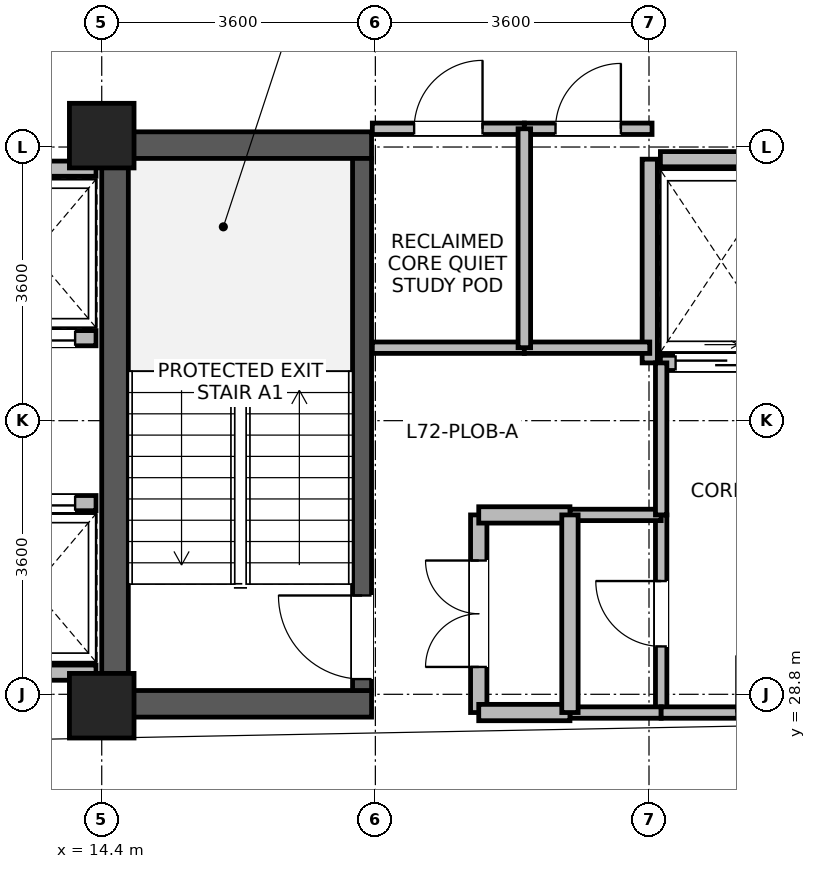
"""IFC4 building model, lengths in metres.
Left out: names, types, materials, properties, quantities, classifications, styles, units other than length and angle.
Written with IfcOpenShell. Run it as: python <this file> out.ifc"""

import sys

from ifc_helpers import new_model, si_unit, direction, frame, frame_2d, origin, origin_2d, place, context, subcontext, project, spatial, rectangle, extrude, source, transform, mapped, element, fill, save


model = new_model("IFC4")
c1 = context("Model", 3, precision=1e-05, world=origin(), true_north=direction((0.0, 1.0)))
c2 = subcontext(c1, "Body", "Model", "MODEL_VIEW")
j1 = project(units=[si_unit("LENGTHUNIT", "METRE"), si_unit("PLANEANGLEUNIT", "RADIAN")], contexts=[c1])
p1 = place(None, origin())
s1 = spatial("IfcSite", under=j1, at=p1, CompositionType="ELEMENT")
p2 = place(p1, origin())
s2 = spatial("IfcBuilding", under=s1, at=p2, CompositionType="ELEMENT")
p3 = place(p2, frame((0.0, 0.0, 279.5)))
s3 = spatial("IfcBuildingStorey", under=s2, at=p3, CompositionType="ELEMENT", Elevation=279.5)
p4 = place(p3, frame((14.575, 28.5, 0.0), z_axis=(0.0, 0.0, 1.0), x_axis=(0.0, 1.0, 0.0)))
e1 = element("IfcWall", 1, at=p4, inside=s3, PredefinedType="SHEAR", context=c2, shape_type="SweptSolid", body=[
    extrude(rectangle(XDim=7.7, YDim=0.35, at=frame_2d((3.85, 0.0))), origin(), (0.0, 0.0, 1.0), 3.475),
])
for number, where, z_axis, x_axis in (
    (2, (14.75, 28.675, 0.0), (0.0, 0.0, 1.0), (1.0, 0.0, 0.0)),
    (3, (14.75, 36.025, 0.0), (0.0, 0.0, 1.0), (1.0, 0.0, 0.0)),
):
    element("IfcWall", number, at=place(p3, frame(where, z_axis=z_axis, x_axis=x_axis)), inside=s3, PredefinedType="SHEAR", context=c2, shape_type="SweptSolid", body=[
        extrude(rectangle(XDim=3.2, YDim=0.35, at=frame_2d((1.6, 0.0))), origin(), (0.0, 0.0, 1.0), 3.475),
    ])
p5 = place(p3, frame((17.825, 28.85, 0.0), z_axis=(0.0, 0.0, 1.0), x_axis=(0.0, 1.0, 0.0)))
e4 = element("IfcWall", 4, at=p5, inside=s3, PredefinedType="SHEAR", context=c2, shape_type="SweptSolid", body=[
    extrude(rectangle(XDim=7.0, YDim=0.25, at=frame_2d((3.5, 0.0))), origin(), (0.0, 0.0, 1.0), 3.475),
])
p6 = place(p5, frame((0.15, 0.0, 0.0)))
e5 = element("IfcOpeningElement", 5, at=p6, cuts=e4, PredefinedType="OPENING", context=c2, shape_type="SweptSolid", body=[
    extrude(rectangle(XDim=1.1, YDim=2.08, at=frame_2d((0.55, 1.04))), frame((0.0, 0.135, 0.0), z_axis=(0.0, -1.0, 0.0), x_axis=(1.0, 0.0, 0.0)), (0.0, 0.0, 1.0), 0.27),
])
m1 = source(origin(), c2, "Body", "SweptSolid", [
    extrude(rectangle(XDim=0.85, YDim=0.85, at=origin_2d()), origin(), (0.0, 0.0, 1.0), 3.7),
])
for number, where, z_axis, x_axis in (
    (6, (14.4, 28.65, 0.0), (0.0, 0.0, 1.0), (1.0, 0.0, 0.0)),
    (7, (14.4, 36.15, 0.0), (0.0, 0.0, 1.0), (1.0, 0.0, 0.0)),
):
    element("IfcColumn", number, at=place(p3, frame(where, z_axis=z_axis, x_axis=x_axis)), inside=s3, PredefinedType="COLUMN", context=c2, shape_type="MappedRepresentation", body=[
        mapped(m1, transform((0.0, 0.0, 0.0), x_axis=(1.0, 0.0, 0.0), y_axis=(0.0, 1.0, 0.0), z_axis=(0.0, 0.0, 1.0), scale=1.0)),
    ])
p7 = place(p3, frame((12.675, 33.485, 0.0), z_axis=(0.0, 0.0, 1.0), x_axis=(1.0, 0.0, 0.0)))
e8 = element("IfcWall", 8, at=p7, inside=s3, PredefinedType="PARTITIONING", context=c2, shape_type="SweptSolid", body=[
    extrude(rectangle(XDim=1.65, YDim=0.2, at=frame_2d((0.825, 0.0))), origin(), (0.0, 0.0, 1.0), 3.455),
])
p8 = place(p7, frame((0.275, 0.0, 0.0)))
e9 = element("IfcOpeningElement", 9, at=p8, cuts=e8, PredefinedType="OPENING", context=c2, shape_type="SweptSolid", body=[
    extrude(rectangle(XDim=1.1, YDim=2.12, at=frame_2d((0.55, 1.06))), frame((0.0, 0.11, 0.0), z_axis=(0.0, -1.0, 0.0), x_axis=(1.0, 0.0, 0.0)), (0.0, 0.0, 1.0), 0.22),
])
for number, where, z_axis, x_axis in (
    (10, (12.675, 35.715, 0.0), (0.0, 0.0, 1.0), (1.0, 0.0, 0.0)),
    (11, (12.675, 29.085, 0.0), (0.0, 0.0, 1.0), (1.0, 0.0, 0.0)),
):
    element("IfcWall", number, at=place(p3, frame(where, z_axis=z_axis, x_axis=x_axis)), inside=s3, PredefinedType="PARTITIONING", context=c2, shape_type="SweptSolid", body=[
        extrude(rectangle(XDim=1.65, YDim=0.2, at=frame_2d((0.825, 0.0))), origin(), (0.0, 0.0, 1.0), 3.455),
    ])
p9 = place(p3, frame((12.675, 31.315, 0.0), z_axis=(0.0, 0.0, 1.0), x_axis=(1.0, 0.0, 0.0)))
e12 = element("IfcWall", 12, at=p9, inside=s3, PredefinedType="PARTITIONING", context=c2, shape_type="SweptSolid", body=[
    extrude(rectangle(XDim=1.65, YDim=0.2, at=frame_2d((0.825, 0.0))), origin(), (0.0, 0.0, 1.0), 3.455),
])
p10 = place(p9, frame((0.275, 0.0, 0.0)))
e13 = element("IfcOpeningElement", 13, at=p10, cuts=e12, PredefinedType="OPENING", context=c2, shape_type="SweptSolid", body=[
    extrude(rectangle(XDim=1.1, YDim=2.12, at=frame_2d((0.55, 1.06))), frame((0.0, 0.11, 0.0), z_axis=(0.0, -1.0, 0.0), x_axis=(1.0, 0.0, 0.0)), (0.0, 0.0, 1.0), 0.22),
])
p11 = place(p3, frame((21.75, 33.16, 0.0), z_axis=(0.0, 0.0, 1.0), x_axis=(1.0, 0.0, 0.0)))
e14 = element("IfcWall", 14, at=p11, inside=s3, PredefinedType="PARTITIONING", context=c2, shape_type="SweptSolid", body=[
    extrude(rectangle(XDim=1.6, YDim=0.2, at=frame_2d((0.8, 0.0))), origin(), (0.0, 0.0, 1.0), 3.455),
])
p12 = place(p11, frame((0.2, 0.0, 0.0)))
e15 = element("IfcOpeningElement", 15, at=p12, cuts=e14, PredefinedType="OPENING", context=c2, shape_type="SweptSolid", body=[
    extrude(rectangle(XDim=1.2, YDim=2.12, at=frame_2d((0.6, 1.06))), frame((0.0, 0.11, 0.0), z_axis=(0.0, -1.0, 0.0), x_axis=(1.0, 0.0, 0.0)), (0.0, 0.0, 1.0), 0.22),
])
p13 = place(p3, frame((21.75, 35.84, 0.0), z_axis=(0.0, 0.0, 1.0), x_axis=(1.0, 0.0, 0.0)))
e16 = element("IfcWall", 16, at=p13, inside=s3, PredefinedType="PARTITIONING", context=c2, shape_type="SweptSolid", body=[
    extrude(rectangle(XDim=1.6, YDim=0.2, at=frame_2d((0.8, 0.0))), origin(), (0.0, 0.0, 1.0), 2.555),
])
p14 = place(p3, frame((21.61, 33.16, 0.0), z_axis=(0.0, 0.0, 1.0), x_axis=(0.0, 1.0, 0.0)))
e17 = element("IfcWall", 17, at=p14, inside=s3, PredefinedType="PARTITIONING", context=c2, shape_type="SweptSolid", body=[
    extrude(rectangle(XDim=2.68, YDim=0.2, at=frame_2d((1.34, 0.0))), origin(), (0.0, 0.0, 1.0), 3.455),
])
p15 = place(p3, frame((19.36, 28.56, 0.0), z_axis=(0.0, 0.0, 1.0), x_axis=(0.0, 1.0, 0.0)))
e18 = element("IfcWall", 18, at=p15, inside=s3, PredefinedType="PARTITIONING", context=c2, shape_type="SweptSolid", body=[
    extrude(rectangle(XDim=2.6, YDim=0.215, at=frame_2d((1.3, 0.0))), origin(), (0.0, 0.0, 1.0), 3.455),
])
p16 = place(p15, frame((0.6, 0.0, 0.0)))
e19 = element("IfcOpeningElement", 19, at=p16, cuts=e18, PredefinedType="OPENING", context=c2, shape_type="SweptSolid", body=[
    extrude(rectangle(XDim=1.4, YDim=2.15, at=frame_2d((0.7, 1.075))), frame((0.0, 0.118, 0.0), z_axis=(0.0, -1.0, 0.0), x_axis=(1.0, 0.0, 0.0)), (0.0, 0.0, 1.0), 0.235),
])
p17 = place(p3, frame((21.76, 28.56, 0.0), z_axis=(0.0, 0.0, 1.0), x_axis=(0.0, 1.0, 0.0)))
e20 = element("IfcWall", 20, at=p17, inside=s3, PredefinedType="PARTITIONING", context=c2, shape_type="SweptSolid", body=[
    extrude(rectangle(XDim=2.6, YDim=0.15, at=frame_2d((1.3, 0.0))), origin(), (0.0, 0.0, 1.0), 3.455),
])
p18 = place(p17, frame((0.87, 0.0, 0.0)))
e21 = element("IfcOpeningElement", 21, at=p18, cuts=e20, PredefinedType="OPENING", context=c2, shape_type="SweptSolid", body=[
    extrude(rectangle(XDim=0.86, YDim=2.02, at=frame_2d((0.43, 1.01))), frame((0.0, 0.085, 0.0), z_axis=(0.0, -1.0, 0.0), x_axis=(1.0, 0.0, 0.0)), (0.0, 0.0, 1.0), 0.17),
])
p19 = place(p3, frame((17.96, 33.36, 0.0), z_axis=(0.0, 0.0, 1.0), x_axis=(1.0, 0.0, 0.0)))
e22 = element("IfcWall", 22, at=p19, inside=s3, PredefinedType="PARTITIONING", context=c2, shape_type="SweptSolid", body=[
    extrude(rectangle(XDim=2.0, YDim=0.15, at=frame_2d((1.0, 0.0))), origin(), (0.0, 0.0, 1.0), 3.455),
])
p20 = place(p3, frame((17.96, 36.24, 0.0), z_axis=(0.0, 0.0, 1.0), x_axis=(1.0, 0.0, 0.0)))
e23 = element("IfcWall", 23, at=p20, inside=s3, PredefinedType="PARTITIONING", context=c2, shape_type="SweptSolid", body=[
    extrude(rectangle(XDim=2.0, YDim=0.15, at=frame_2d((1.0, 0.0))), origin(), (0.0, 0.0, 1.0), 2.555),
])
p21 = place(p20, frame((0.55, 0.0, 0.0)))
e24 = element("IfcOpeningElement", 24, at=p21, cuts=e23, PredefinedType="OPENING", context=c2, shape_type="SweptSolid", body=[
    extrude(rectangle(XDim=0.9, YDim=2.08, at=frame_2d((0.45, 1.04))), frame((0.0, 0.085, 0.0), z_axis=(0.0, -1.0, 0.0), x_axis=(1.0, 0.0, 0.0)), (0.0, 0.0, 1.0), 0.17),
])
p22 = place(p3, frame((19.96, 33.36, 0.0), z_axis=(0.0, 0.0, 1.0), x_axis=(1.0, 0.0, 0.0)))
e25 = element("IfcWall", 25, at=p22, inside=s3, PredefinedType="PARTITIONING", context=c2, shape_type="SweptSolid", body=[
    extrude(rectangle(XDim=1.65, YDim=0.15, at=frame_2d((0.825, 0.0))), origin(), (0.0, 0.0, 1.0), 3.455),
])
p23 = place(p3, frame((19.96, 36.24, 0.0), z_axis=(0.0, 0.0, 1.0), x_axis=(1.0, 0.0, 0.0)))
e26 = element("IfcWall", 26, at=p23, inside=s3, PredefinedType="PARTITIONING", context=c2, shape_type="SweptSolid", body=[
    extrude(rectangle(XDim=1.68, YDim=0.15, at=frame_2d((0.84, 0.0))), origin(), (0.0, 0.0, 1.0), 2.555),
])
p24 = place(p23, frame((0.41, 0.0, 0.0)))
e27 = element("IfcOpeningElement", 27, at=p24, cuts=e26, PredefinedType="OPENING", context=c2, shape_type="SweptSolid", body=[
    extrude(rectangle(XDim=0.86, YDim=2.02, at=frame_2d((0.43, 1.01))), frame((0.0, 0.085, 0.0), z_axis=(0.0, -1.0, 0.0), x_axis=(1.0, 0.0, 0.0)), (0.0, 0.0, 1.0), 0.17),
])
p25 = place(p3, frame((20.56, 28.56, 0.0), z_axis=(0.0, 0.0, 1.0), x_axis=(1.0, 0.0, 0.0)))
e28 = element("IfcWall", 28, at=p25, inside=s3, PredefinedType="PARTITIONING", context=c2, shape_type="SweptSolid", body=[
    extrude(rectangle(XDim=1.2, YDim=0.15, at=frame_2d((0.6, 0.0))), origin(), (0.0, 0.0, 1.0), 2.555),
])
p26 = place(p3, frame((20.56, 31.16, 0.0), z_axis=(0.0, 0.0, 1.0), x_axis=(1.0, 0.0, 0.0)))
e29 = element("IfcWall", 29, at=p26, inside=s3, PredefinedType="PARTITIONING", context=c2, shape_type="SweptSolid", body=[
    extrude(rectangle(XDim=1.2, YDim=0.15, at=frame_2d((0.6, 0.0))), origin(), (0.0, 0.0, 1.0), 3.455),
])
p27 = place(p3, frame((19.36, 28.56, 0.0), z_axis=(0.0, 0.0, 1.0), x_axis=(1.0, 0.0, 0.0)))
e30 = element("IfcWall", 30, at=p27, inside=s3, PredefinedType="PARTITIONING", context=c2, shape_type="SweptSolid", body=[
    extrude(rectangle(XDim=1.2, YDim=0.215, at=frame_2d((0.6, 0.0))), origin(), (0.0, 0.0, 1.0), 2.555),
])
p28 = place(p3, frame((19.36, 31.16, 0.0), z_axis=(0.0, 0.0, 1.0), x_axis=(1.0, 0.0, 0.0)))
e31 = element("IfcWall", 31, at=p28, inside=s3, PredefinedType="PARTITIONING", context=c2, shape_type="SweptSolid", body=[
    extrude(rectangle(XDim=1.2, YDim=0.215, at=frame_2d((0.6, 0.0))), origin(), (0.0, 0.0, 1.0), 3.455),
])
p29 = place(p3, frame((21.76, 28.56, 0.0), z_axis=(0.0, 0.0, 1.0), x_axis=(1.0, 0.0, 0.0)))
e32 = element("IfcWall", 32, at=p29, inside=s3, PredefinedType="PARTITIONING", context=c2, shape_type="SweptSolid", body=[
    extrude(rectangle(XDim=3.48, YDim=0.15, at=frame_2d((1.74, 0.0))), origin(), (0.0, 0.0, 1.0), 2.555),
])
p30 = place(p29, frame((0.99, 0.0, 0.0)))
e33 = element("IfcOpeningElement", 33, at=p30, cuts=e32, PredefinedType="OPENING", context=c2, shape_type="SweptSolid", body=[
    extrude(rectangle(XDim=1.5, YDim=2.1, at=frame_2d((0.75, 1.05))), frame((0.0, 0.085, 0.0), z_axis=(0.0, -1.0, 0.0), x_axis=(1.0, 0.0, 0.0)), (0.0, 0.0, 1.0), 0.17),
])
p31 = place(p3, frame((19.96, 33.36, 0.0), z_axis=(0.0, 0.0, 1.0), x_axis=(0.0, 1.0, 0.0)))
e34 = element("IfcWall", 34, at=p31, inside=s3, PredefinedType="PARTITIONING", context=c2, shape_type="SweptSolid", body=[
    extrude(rectangle(XDim=2.88, YDim=0.165, at=frame_2d((1.44, 0.0))), origin(), (0.0, 0.0, 1.0), 3.455),
])
p32 = place(p3, frame((20.56, 28.56, 0.0), z_axis=(0.0, 0.0, 1.0), x_axis=(0.0, 1.0, 0.0)))
e35 = element("IfcWall", 35, at=p32, inside=s3, PredefinedType="PARTITIONING", context=c2, shape_type="SweptSolid", body=[
    extrude(rectangle(XDim=2.6, YDim=0.215, at=frame_2d((1.3, 0.0))), origin(), (0.0, 0.0, 1.0), 3.455),
])
p33 = place(p3, frame((21.76, 31.16, 0.0), z_axis=(0.0, 0.0, 1.0), x_axis=(0.0, 1.0, 0.0)))
e36 = element("IfcWall", 36, at=p33, inside=s3, PredefinedType="PARTITIONING", context=c2, shape_type="SweptSolid", body=[
    extrude(rectangle(XDim=2.0, YDim=0.15, at=frame_2d((1.0, 0.0))), origin(), (0.0, 0.0, 1.0), 3.455),
])
p34 = place(p6, origin())
e37 = element("IfcDoor", 37, at=p34, inside=s3, OperationType="SINGLE_SWING_RIGHT", PredefinedType="DOOR", context=c2, shape_type="SweptSolid", body=[
    extrude(rectangle(XDim=1.1, YDim=2.08, at=frame_2d((0.55, 1.04))), frame((0.0, 0.025, 0.0), z_axis=(0.0, -1.0, 0.0), x_axis=(1.0, 0.0, 0.0)), (0.0, 0.0, 1.0), 0.05),
])
fill(e5, e37)
p35 = place(p8, origin())
e38 = element("IfcDoor", 38, at=p35, inside=s3, OperationType="SLIDING_TO_LEFT", PredefinedType="DOOR", context=c2, shape_type="SweptSolid", body=[
    extrude(rectangle(XDim=1.1, YDim=2.12, at=frame_2d((0.55, 1.06))), frame((0.0, 0.025, 0.0), z_axis=(0.0, -1.0, 0.0), x_axis=(1.0, 0.0, 0.0)), (0.0, 0.0, 1.0), 0.05),
])
fill(e9, e38)
p36 = place(p10, origin())
e39 = element("IfcDoor", 39, at=p36, inside=s3, OperationType="SLIDING_TO_LEFT", PredefinedType="DOOR", context=c2, shape_type="SweptSolid", body=[
    extrude(rectangle(XDim=1.1, YDim=2.12, at=frame_2d((0.55, 1.06))), frame((0.0, 0.025, 0.0), z_axis=(0.0, -1.0, 0.0), x_axis=(1.0, 0.0, 0.0)), (0.0, 0.0, 1.0), 0.05),
])
fill(e13, e39)
p37 = place(p12, origin())
e40 = element("IfcDoor", 40, at=p37, inside=s3, OperationType="SLIDING_TO_RIGHT", PredefinedType="DOOR", context=c2, shape_type="SweptSolid", body=[
    extrude(rectangle(XDim=1.2, YDim=2.12, at=frame_2d((0.6, 1.06))), frame((0.0, 0.025, 0.0), z_axis=(0.0, -1.0, 0.0), x_axis=(1.0, 0.0, 0.0)), (0.0, 0.0, 1.0), 0.05),
])
fill(e15, e40)
p38 = place(p16, origin())
e41 = element("IfcDoor", 41, at=p38, inside=s3, OperationType="DOUBLE_DOOR_SINGLE_SWING", PredefinedType="DOOR", context=c2, shape_type="SweptSolid", body=[
    extrude(rectangle(XDim=1.4, YDim=2.15, at=frame_2d((0.7, 1.075))), frame((0.0, 0.025, 0.0), z_axis=(0.0, -1.0, 0.0), x_axis=(1.0, 0.0, 0.0)), (0.0, 0.0, 1.0), 0.05),
])
fill(e19, e41)
p39 = place(p18, origin())
e42 = element("IfcDoor", 42, at=p39, inside=s3, OperationType="SINGLE_SWING_RIGHT", PredefinedType="DOOR", context=c2, shape_type="SweptSolid", body=[
    extrude(rectangle(XDim=0.86, YDim=2.02, at=frame_2d((0.43, 1.01))), frame((0.0, 0.025, 0.0), z_axis=(0.0, -1.0, 0.0), x_axis=(1.0, 0.0, 0.0)), (0.0, 0.0, 1.0), 0.05),
])
fill(e21, e42)
p40 = place(p21, origin())
e43 = element("IfcDoor", 43, at=p40, inside=s3, OperationType="SINGLE_SWING_RIGHT", PredefinedType="DOOR", context=c2, shape_type="SweptSolid", body=[
    extrude(rectangle(XDim=0.9, YDim=2.08, at=frame_2d((0.45, 1.04))), frame((0.0, 0.025, 0.0), z_axis=(0.0, -1.0, 0.0), x_axis=(1.0, 0.0, 0.0)), (0.0, 0.0, 1.0), 0.05),
])
fill(e24, e43)
p41 = place(p24, origin())
e44 = element("IfcDoor", 44, at=p41, inside=s3, OperationType="SINGLE_SWING_RIGHT", PredefinedType="DOOR", context=c2, shape_type="SweptSolid", body=[
    extrude(rectangle(XDim=0.86, YDim=2.02, at=frame_2d((0.43, 1.01))), frame((0.0, 0.025, 0.0), z_axis=(0.0, -1.0, 0.0), x_axis=(1.0, 0.0, 0.0)), (0.0, 0.0, 1.0), 0.05),
])
fill(e27, e44)
save(model, sys.argv[1])
